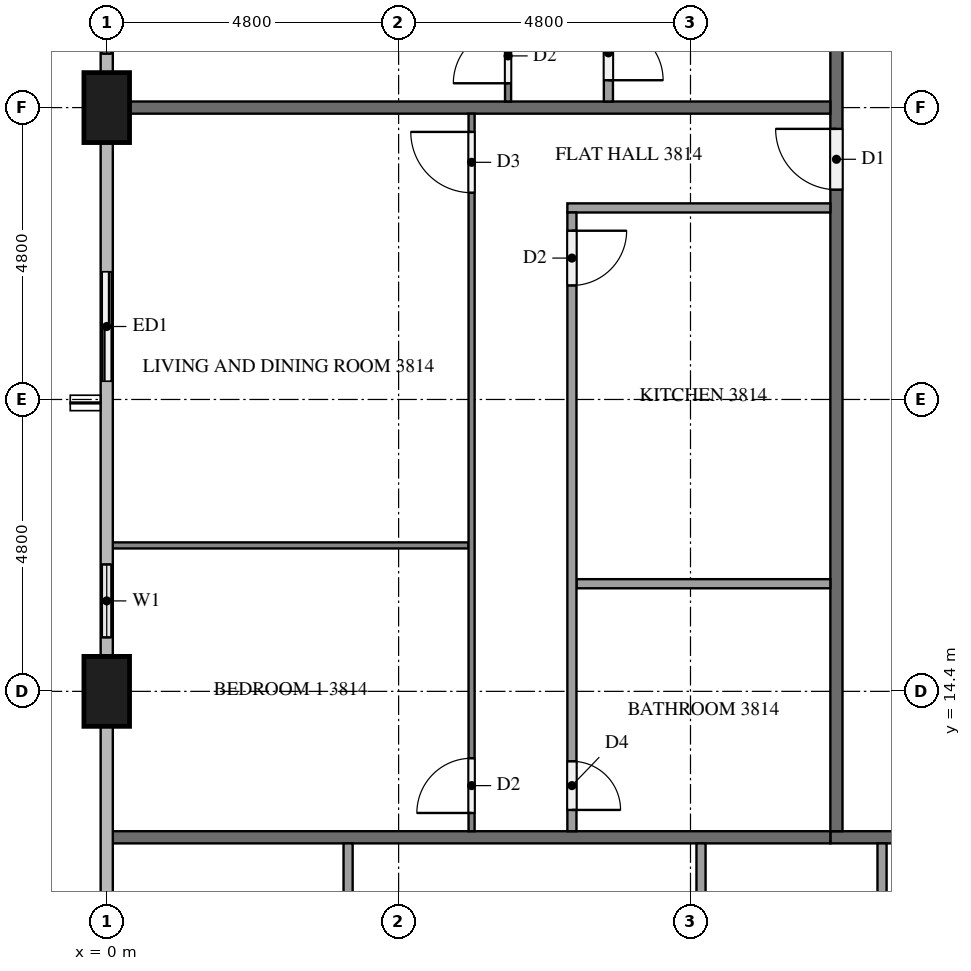
"""IFC4 building model, lengths in metres.
Left out: names, types, materials, properties, quantities, classifications, styles, units other than length and angle.
Written with IfcOpenShell. Run it as: python <this file> out.ifc"""

import sys

from ifc_helpers import new_model, si_unit, direction, frame, frame_2d, origin, origin_2d, place, context, subcontext, project, spatial, rectangle, extrude, element, fill, save


model = new_model("IFC4")
c1 = context("Model", 3, precision=1e-05, world=origin(), true_north=direction((0.0, 1.0)))
c2 = subcontext(c1, "Body", "Model", "MODEL_VIEW")
j1 = project(units=[si_unit("LENGTHUNIT", "METRE"), si_unit("PLANEANGLEUNIT", "RADIAN")], contexts=[c1])
p1 = place(None, origin())
s1 = spatial("IfcSite", under=j1, at=p1, CompositionType="ELEMENT")
p2 = place(p1, origin())
s2 = spatial("IfcBuilding", under=s1, at=p2, CompositionType="ELEMENT")
p3 = place(p2, frame((0.0, 0.0, 149.0)))
s3 = spatial("IfcBuildingStorey", under=s2, at=p3, CompositionType="ELEMENT", Elevation=149.0)
for number, where, z_axis, x_axis in (
    (1, (0.0, 24.0, 0.0), (0.0, 0.0, 1.0), (0.0, 1.0, 0.0)),
    (2, (0.0, 14.4, 0.0), (0.0, 0.0, 1.0), (0.0, 1.0, 0.0)),
):
    element("IfcColumn", number, at=place(p3, frame(where, z_axis=z_axis, x_axis=x_axis)), inside=s3, PredefinedType="COLUMN", context=c2, shape_type="SweptSolid", body=[
        extrude(rectangle(XDim=1.15, YDim=0.75, at=origin_2d()), origin(), (0.0, 0.0, 1.0), 3.2),
    ])
p4 = place(p3, frame((0.0, 26.4, 0.0), z_axis=(0.0, 0.0, 1.0), x_axis=(0.0, -1.0, 0.0)))
e3 = element("IfcWall", 3, at=p4, inside=s3, PredefinedType="SOLIDWALL", context=c2, shape_type="SweptSolid", body=[
    extrude(rectangle(XDim=1.825, YDim=0.15, at=frame_2d((0.913, 0.0))), origin(), (0.0, 0.0, 1.0), 3.2),
])
p5 = place(p4, frame((0.312, 0.0, 0.9)))
e4 = element("IfcOpeningElement", 4, at=p5, cuts=e3, PredefinedType="OPENING", context=c2, shape_type="SweptSolid", body=[
    extrude(rectangle(XDim=1.2, YDim=1.4, at=frame_2d((0.6, 0.7))), frame((0.0, 0.085, 0.0), z_axis=(0.0, -1.0, 0.0), x_axis=(1.0, 0.0, 0.0)), (0.0, 0.0, 1.0), 0.17),
])
p6 = place(p3, frame((0.0, 21.6, 0.0), z_axis=(0.0, 0.0, 1.0), x_axis=(0.0, -1.0, 0.0)))
e5 = element("IfcWall", 5, at=p6, inside=s3, PredefinedType="SOLIDWALL", context=c2, shape_type="SweptSolid", body=[
    extrude(rectangle(XDim=2.4, YDim=0.15, at=frame_2d((1.2, 0.0))), origin(), (0.0, 0.0, 1.0), 3.2),
])
p7 = place(p6, frame((0.3, 0.0, 0.0)))
e6 = element("IfcOpeningElement", 6, at=p7, cuts=e5, PredefinedType="OPENING", context=c2, shape_type="SweptSolid", body=[
    extrude(rectangle(XDim=1.8, YDim=2.4, at=frame_2d((0.9, 1.2))), frame((0.0, 0.085, 0.0), z_axis=(0.0, -1.0, 0.0), x_axis=(1.0, 0.0, 0.0)), (0.0, 0.0, 1.0), 0.17),
])
p8 = place(p3, frame((0.0, 16.8, 0.0), z_axis=(0.0, 0.0, 1.0), x_axis=(0.0, -1.0, 0.0)))
e7 = element("IfcWall", 7, at=p8, inside=s3, PredefinedType="SOLIDWALL", context=c2, shape_type="SweptSolid", body=[
    extrude(rectangle(XDim=1.825, YDim=0.15, at=frame_2d((0.913, 0.0))), origin(), (0.0, 0.0, 1.0), 3.2),
])
p9 = place(p8, frame((0.312, 0.0, 0.9)))
e8 = element("IfcOpeningElement", 8, at=p9, cuts=e7, PredefinedType="OPENING", context=c2, shape_type="SweptSolid", body=[
    extrude(rectangle(XDim=1.2, YDim=1.4, at=frame_2d((0.6, 0.7))), frame((0.0, 0.085, 0.0), z_axis=(0.0, -1.0, 0.0), x_axis=(1.0, 0.0, 0.0)), (0.0, 0.0, 1.0), 0.17),
])
p10 = place(p3, frame((50.5, 12.0, 0.0), z_axis=(0.0, 0.0, 1.0), x_axis=(-1.0, 0.0, 0.0)))
e9 = element("IfcWall", 9, at=p10, inside=s3, PredefinedType="PARTITIONING", context=c2, shape_type="SweptSolid", body=[
    extrude(rectangle(XDim=38.6, YDim=0.2, at=frame_2d((19.3, 0.0))), origin(), (0.0, 0.0, 1.0), 3.2),
])
p11 = place(p10, frame((36.45, 0.0, 0.0)))
e10 = element("IfcOpeningElement", 10, at=p11, cuts=e9, PredefinedType="OPENING", context=c2, shape_type="SweptSolid", body=[
    extrude(rectangle(XDim=1.0, YDim=2.1, at=frame_2d((0.5, 1.05))), frame((0.0, 0.11, 0.0), z_axis=(0.0, -1.0, 0.0), x_axis=(1.0, 0.0, 0.0)), (0.0, 0.0, 1.0), 0.22),
])
p12 = place(p10, frame((34.75, 0.0, 0.0)))
e11 = element("IfcOpeningElement", 11, at=p12, cuts=e9, PredefinedType="OPENING", context=c2, shape_type="SweptSolid", body=[
    extrude(rectangle(XDim=1.0, YDim=2.1, at=frame_2d((0.5, 1.05))), frame((0.0, 0.11, 0.0), z_axis=(0.0, -1.0, 0.0), x_axis=(1.0, 0.0, 0.0)), (0.0, 0.0, 1.0), 0.22),
])
p13 = place(p10, frame((10.05, 0.0, 0.0)))
e12 = element("IfcOpeningElement", 12, at=p13, cuts=e9, PredefinedType="OPENING", context=c2, shape_type="SweptSolid", body=[
    extrude(rectangle(XDim=1.0, YDim=2.1, at=frame_2d((0.5, 1.05))), frame((0.0, 0.11, 0.0), z_axis=(0.0, -1.0, 0.0), x_axis=(1.0, 0.0, 0.0)), (0.0, 0.0, 1.0), 0.22),
])
p14 = place(p10, frame((8.35, 0.0, 0.0)))
e13 = element("IfcOpeningElement", 13, at=p14, cuts=e9, PredefinedType="OPENING", context=c2, shape_type="SweptSolid", body=[
    extrude(rectangle(XDim=1.0, YDim=2.1, at=frame_2d((0.5, 1.05))), frame((0.0, 0.11, 0.0), z_axis=(0.0, -1.0, 0.0), x_axis=(1.0, 0.0, 0.0)), (0.0, 0.0, 1.0), 0.22),
])
p15 = place(p3, frame((12.0, 12.1, 0.0), z_axis=(0.0, 0.0, 1.0), x_axis=(0.0, 1.0, 0.0)))
e14 = element("IfcWall", 14, at=p15, inside=s3, PredefinedType="PARTITIONING", context=c2, shape_type="SweptSolid", body=[
    extrude(rectangle(XDim=28.6, YDim=0.2, at=frame_2d((14.3, 0.0))), origin(), (0.0, 0.0, 1.0), 3.2),
])
p16 = place(p15, frame((27.35, 0.0, 0.0)))
e15 = element("IfcOpeningElement", 15, at=p16, cuts=e14, PredefinedType="OPENING", context=c2, shape_type="SweptSolid", body=[
    extrude(rectangle(XDim=1.0, YDim=2.1, at=frame_2d((0.5, 1.05))), frame((0.0, 0.11, 0.0), z_axis=(0.0, -1.0, 0.0), x_axis=(1.0, 0.0, 0.0)), (0.0, 0.0, 1.0), 0.22),
])
p17 = place(p15, frame((20.15, 0.0, 0.0)))
e16 = element("IfcOpeningElement", 16, at=p17, cuts=e14, PredefinedType="OPENING", context=c2, shape_type="SweptSolid", body=[
    extrude(rectangle(XDim=1.0, YDim=2.1, at=frame_2d((0.5, 1.05))), frame((0.0, 0.11, 0.0), z_axis=(0.0, -1.0, 0.0), x_axis=(1.0, 0.0, 0.0)), (0.0, 0.0, 1.0), 0.22),
])
p18 = place(p15, frame((10.55, 0.0, 0.0)))
e17 = element("IfcOpeningElement", 17, at=p18, cuts=e14, PredefinedType="OPENING", context=c2, shape_type="SweptSolid", body=[
    extrude(rectangle(XDim=1.0, YDim=2.1, at=frame_2d((0.5, 1.05))), frame((0.0, 0.11, 0.0), z_axis=(0.0, -1.0, 0.0), x_axis=(1.0, 0.0, 0.0)), (0.0, 0.0, 1.0), 0.22),
])
p19 = place(p3, frame((0.1, 12.0, 0.0), z_axis=(0.0, 0.0, 1.0), x_axis=(1.0, 0.0, 0.0)))
e18 = element("IfcWall", 18, at=p19, inside=s3, PredefinedType="PARTITIONING", context=c2, shape_type="SweptSolid", body=[
    extrude(rectangle(XDim=11.8, YDim=0.2, at=frame_2d((5.9, 0.0))), origin(), (0.0, 0.0, 1.0), 3.2),
])
p20 = place(p3, frame((0.375, 24.0, 0.0), z_axis=(0.0, 0.0, 1.0), x_axis=(1.0, 0.0, 0.0)))
e19 = element("IfcWall", 19, at=p20, inside=s3, PredefinedType="PARTITIONING", context=c2, shape_type="SweptSolid", body=[
    extrude(rectangle(XDim=11.525, YDim=0.2, at=frame_2d((5.762, 0.0))), origin(), (0.0, 0.0, 1.0), 3.2),
])
for number, where, z_axis, x_axis in (
    (20, (9.773, 11.9, 0.0), (0.0, 0.0, 1.0), (0.0, -1.0, 0.0)),
    (21, (3.969, 11.9, 0.0), (0.0, 0.0, 1.0), (0.0, -1.0, 0.0)),
):
    element("IfcWall", number, at=place(p3, frame(where, z_axis=z_axis, x_axis=x_axis)), inside=s3, PredefinedType="PARTITIONING", context=c2, shape_type="SweptSolid", body=[
        extrude(rectangle(XDim=2.975, YDim=0.15, at=frame_2d((1.487, 0.0))), origin(), (0.0, 0.0, 1.0), 3.2),
    ])
p21 = place(p3, frame((12.75, 11.9, 0.0), z_axis=(0.0, 0.0, 1.0), x_axis=(0.0, -1.0, 0.0)))
e22 = element("IfcWall", 22, at=p21, inside=s3, PredefinedType="PARTITIONING", context=c2, shape_type="SweptSolid", body=[
    extrude(rectangle(XDim=3.125, YDim=0.15, at=frame_2d((1.562, 0.0))), origin(), (0.0, 0.0, 1.0), 3.2),
])
p22 = place(p3, frame((6.6, 24.1, 0.0), z_axis=(0.0, 0.0, 1.0), x_axis=(0.0, 1.0, 0.0)))
e23 = element("IfcWall", 23, at=p22, inside=s3, PredefinedType="PARTITIONING", context=c2, shape_type="SweptSolid", body=[
    extrude(rectangle(XDim=9.4, YDim=0.1, at=frame_2d((4.7, 0.0))), origin(), (0.0, 0.0, 1.0), 3.2),
])
p23 = place(p22, frame((8.1, 0.0, 0.0)))
e24 = element("IfcOpeningElement", 24, at=p23, cuts=e23, PredefinedType="OPENING", context=c2, shape_type="SweptSolid", body=[
    extrude(rectangle(XDim=1.0, YDim=2.1, at=frame_2d((0.5, 1.05))), frame((0.0, 0.06, 0.0), z_axis=(0.0, -1.0, 0.0), x_axis=(1.0, 0.0, 0.0)), (0.0, 0.0, 1.0), 0.12),
])
p24 = place(p22, frame((0.3, 0.0, 0.0)))
e25 = element("IfcOpeningElement", 25, at=p24, cuts=e23, PredefinedType="OPENING", context=c2, shape_type="SweptSolid", body=[
    extrude(rectangle(XDim=0.9, YDim=2.1, at=frame_2d((0.45, 1.05))), frame((0.0, 0.06, 0.0), z_axis=(0.0, -1.0, 0.0), x_axis=(1.0, 0.0, 0.0)), (0.0, 0.0, 1.0), 0.12),
])
p25 = place(p3, frame((8.25, 31.875, 0.0), z_axis=(0.0, 0.0, 1.0), x_axis=(0.0, -1.0, 0.0)))
e26 = element("IfcWall", 26, at=p25, inside=s3, PredefinedType="PARTITIONING", context=c2, shape_type="SweptSolid", body=[
    extrude(rectangle(XDim=7.775, YDim=0.15, at=frame_2d((3.887, 0.0))), origin(), (0.0, 0.0, 1.0), 3.2),
])
p26 = place(p25, frame((0.3, 0.0, 0.0)))
e27 = element("IfcOpeningElement", 27, at=p26, cuts=e26, PredefinedType="OPENING", context=c2, shape_type="SweptSolid", body=[
    extrude(rectangle(XDim=0.8, YDim=2.1, at=frame_2d((0.4, 1.05))), frame((0.0, 0.085, 0.0), z_axis=(0.0, -1.0, 0.0), x_axis=(1.0, 0.0, 0.0)), (0.0, 0.0, 1.0), 0.17),
])
p27 = place(p25, frame((6.525, 0.0, 0.0)))
e28 = element("IfcOpeningElement", 28, at=p27, cuts=e26, PredefinedType="OPENING", context=c2, shape_type="SweptSolid", body=[
    extrude(rectangle(XDim=0.9, YDim=2.1, at=frame_2d((0.45, 1.05))), frame((0.0, 0.085, 0.0), z_axis=(0.0, -1.0, 0.0), x_axis=(1.0, 0.0, 0.0)), (0.0, 0.0, 1.0), 0.17),
])
p28 = place(p3, frame((5.95, 16.8, 0.0), z_axis=(0.0, 0.0, 1.0), x_axis=(-1.0, 0.0, 0.0)))
e29 = element("IfcWall", 29, at=p28, inside=s3, PredefinedType="PARTITIONING", context=c2, shape_type="SweptSolid", body=[
    extrude(rectangle(XDim=5.85, YDim=0.1, at=frame_2d((2.925, 0.0))), origin(), (0.0, 0.0, 1.0), 3.2),
])
p29 = place(p3, frame((6.0, 12.1, 0.0), z_axis=(0.0, 0.0, 1.0), x_axis=(0.0, 1.0, 0.0)))
e30 = element("IfcWall", 30, at=p29, inside=s3, PredefinedType="PARTITIONING", context=c2, shape_type="SweptSolid", body=[
    extrude(rectangle(XDim=11.8, YDim=0.1, at=frame_2d((5.9, 0.0))), origin(), (0.0, 0.0, 1.0), 3.2),
])
p30 = place(p29, frame((10.5, 0.0, 0.0)))
e31 = element("IfcOpeningElement", 31, at=p30, cuts=e30, PredefinedType="OPENING", context=c2, shape_type="SweptSolid", body=[
    extrude(rectangle(XDim=1.0, YDim=2.1, at=frame_2d((0.5, 1.05))), frame((0.0, 0.06, 0.0), z_axis=(0.0, -1.0, 0.0), x_axis=(1.0, 0.0, 0.0)), (0.0, 0.0, 1.0), 0.12),
])
p31 = place(p29, frame((0.3, 0.0, 0.0)))
e32 = element("IfcOpeningElement", 32, at=p31, cuts=e30, PredefinedType="OPENING", context=c2, shape_type="SweptSolid", body=[
    extrude(rectangle(XDim=0.9, YDim=2.1, at=frame_2d((0.45, 1.05))), frame((0.0, 0.06, 0.0), z_axis=(0.0, -1.0, 0.0), x_axis=(1.0, 0.0, 0.0)), (0.0, 0.0, 1.0), 0.12),
])
p32 = place(p3, frame((11.9, 16.17, 0.0), z_axis=(0.0, 0.0, 1.0), x_axis=(-1.0, 0.0, 0.0)))
e33 = element("IfcWall", 33, at=p32, inside=s3, PredefinedType="PARTITIONING", context=c2, shape_type="SweptSolid", body=[
    extrude(rectangle(XDim=4.175, YDim=0.15, at=frame_2d((2.087, 0.0))), origin(), (0.0, 0.0, 1.0), 3.2),
])
p33 = place(p3, frame((11.9, 22.35, 0.0), z_axis=(0.0, 0.0, 1.0), x_axis=(-1.0, 0.0, 0.0)))
e34 = element("IfcWall", 34, at=p33, inside=s3, PredefinedType="PARTITIONING", context=c2, shape_type="SweptSolid", body=[
    extrude(rectangle(XDim=4.325, YDim=0.15, at=frame_2d((2.163, 0.0))), origin(), (0.0, 0.0, 1.0), 3.2),
])
p34 = place(p3, frame((7.65, 22.275, 0.0), z_axis=(0.0, 0.0, 1.0), x_axis=(0.0, -1.0, 0.0)))
e35 = element("IfcWall", 35, at=p34, inside=s3, PredefinedType="PARTITIONING", context=c2, shape_type="SweptSolid", body=[
    extrude(rectangle(XDim=10.175, YDim=0.15, at=frame_2d((5.087, 0.0))), origin(), (0.0, 0.0, 1.0), 3.2),
])
p35 = place(p34, frame((0.3, 0.0, 0.0)))
e36 = element("IfcOpeningElement", 36, at=p35, cuts=e35, PredefinedType="OPENING", context=c2, shape_type="SweptSolid", body=[
    extrude(rectangle(XDim=0.9, YDim=2.1, at=frame_2d((0.45, 1.05))), frame((0.0, 0.085, 0.0), z_axis=(0.0, -1.0, 0.0), x_axis=(1.0, 0.0, 0.0)), (0.0, 0.0, 1.0), 0.17),
])
p36 = place(p34, frame((9.025, 0.0, 0.0)))
e37 = element("IfcOpeningElement", 37, at=p36, cuts=e35, PredefinedType="OPENING", context=c2, shape_type="SweptSolid", body=[
    extrude(rectangle(XDim=0.8, YDim=2.1, at=frame_2d((0.4, 1.05))), frame((0.0, 0.085, 0.0), z_axis=(0.0, -1.0, 0.0), x_axis=(1.0, 0.0, 0.0)), (0.0, 0.0, 1.0), 0.17),
])
p37 = place(p5, origin())
e38 = element("IfcWindow", 38, at=p37, inside=s3, PartitioningType="SINGLE_PANEL", PredefinedType="WINDOW", context=c2, shape_type="SweptSolid", body=[
    extrude(rectangle(XDim=1.2, YDim=1.4, at=frame_2d((0.6, 0.7))), frame((0.0, 0.03, 0.0), z_axis=(0.0, -1.0, 0.0), x_axis=(1.0, 0.0, 0.0)), (0.0, 0.0, 1.0), 0.06),
])
fill(e4, e38)
p38 = place(p7, origin())
e39 = element("IfcDoor", 39, at=p38, inside=s3, OperationType="SLIDING_TO_LEFT", PredefinedType="DOOR", context=c2, shape_type="SweptSolid", body=[
    extrude(rectangle(XDim=1.8, YDim=2.4, at=frame_2d((0.9, 1.2))), frame((0.0, 0.025, 0.0), z_axis=(0.0, -1.0, 0.0), x_axis=(1.0, 0.0, 0.0)), (0.0, 0.0, 1.0), 0.05),
])
fill(e6, e39)
p39 = place(p9, origin())
e40 = element("IfcWindow", 40, at=p39, inside=s3, PartitioningType="SINGLE_PANEL", PredefinedType="WINDOW", context=c2, shape_type="SweptSolid", body=[
    extrude(rectangle(XDim=1.2, YDim=1.4, at=frame_2d((0.6, 0.7))), frame((0.0, 0.03, 0.0), z_axis=(0.0, -1.0, 0.0), x_axis=(1.0, 0.0, 0.0)), (0.0, 0.0, 1.0), 0.06),
])
fill(e8, e40)
p40 = place(p18, origin())
e41 = element("IfcDoor", 41, at=p40, inside=s3, OperationType="SINGLE_SWING_RIGHT", PredefinedType="DOOR", context=c2, shape_type="SweptSolid", body=[
    extrude(rectangle(XDim=1.0, YDim=2.1, at=frame_2d((0.5, 1.05))), frame((0.0, 0.025, 0.0), z_axis=(0.0, -1.0, 0.0), x_axis=(1.0, 0.0, 0.0)), (0.0, 0.0, 1.0), 0.05),
])
fill(e17, e41)
p41 = place(p24, origin())
e42 = element("IfcDoor", 42, at=p41, inside=s3, OperationType="SINGLE_SWING_LEFT", PredefinedType="DOOR", context=c2, shape_type="SweptSolid", body=[
    extrude(rectangle(XDim=0.9, YDim=2.1, at=frame_2d((0.45, 1.05))), frame((0.0, 0.025, 0.0), z_axis=(0.0, -1.0, 0.0), x_axis=(1.0, 0.0, 0.0)), (0.0, 0.0, 1.0), 0.05),
])
fill(e25, e42)
p42 = place(p27, origin())
e43 = element("IfcDoor", 43, at=p42, inside=s3, OperationType="SINGLE_SWING_RIGHT", PredefinedType="DOOR", context=c2, shape_type="SweptSolid", body=[
    extrude(rectangle(XDim=0.9, YDim=2.1, at=frame_2d((0.45, 1.05))), frame((0.0, 0.025, 0.0), z_axis=(0.0, -1.0, 0.0), x_axis=(1.0, 0.0, 0.0)), (0.0, 0.0, 1.0), 0.05),
])
fill(e28, e43)
p43 = place(p30, origin())
e44 = element("IfcDoor", 44, at=p43, inside=s3, OperationType="SINGLE_SWING_RIGHT", PredefinedType="DOOR", context=c2, shape_type="SweptSolid", body=[
    extrude(rectangle(XDim=1.0, YDim=2.1, at=frame_2d((0.5, 1.05))), frame((0.0, 0.025, 0.0), z_axis=(0.0, -1.0, 0.0), x_axis=(1.0, 0.0, 0.0)), (0.0, 0.0, 1.0), 0.05),
])
fill(e31, e44)
p44 = place(p31, origin())
e45 = element("IfcDoor", 45, at=p44, inside=s3, OperationType="SINGLE_SWING_LEFT", PredefinedType="DOOR", context=c2, shape_type="SweptSolid", body=[
    extrude(rectangle(XDim=0.9, YDim=2.1, at=frame_2d((0.45, 1.05))), frame((0.0, 0.025, 0.0), z_axis=(0.0, -1.0, 0.0), x_axis=(1.0, 0.0, 0.0)), (0.0, 0.0, 1.0), 0.05),
])
fill(e32, e45)
p45 = place(p35, origin())
e46 = element("IfcDoor", 46, at=p45, inside=s3, OperationType="SINGLE_SWING_LEFT", PredefinedType="DOOR", context=c2, shape_type="SweptSolid", body=[
    extrude(rectangle(XDim=0.9, YDim=2.1, at=frame_2d((0.45, 1.05))), frame((0.0, 0.025, 0.0), z_axis=(0.0, -1.0, 0.0), x_axis=(1.0, 0.0, 0.0)), (0.0, 0.0, 1.0), 0.05),
])
fill(e36, e46)
p46 = place(p36, origin())
e47 = element("IfcDoor", 47, at=p46, inside=s3, OperationType="SINGLE_SWING_RIGHT", PredefinedType="DOOR", context=c2, shape_type="SweptSolid", body=[
    extrude(rectangle(XDim=0.8, YDim=2.1, at=frame_2d((0.4, 1.05))), frame((0.0, 0.025, 0.0), z_axis=(0.0, -1.0, 0.0), x_axis=(1.0, 0.0, 0.0)), (0.0, 0.0, 1.0), 0.05),
])
fill(e37, e47)
save(model, sys.argv[1])
